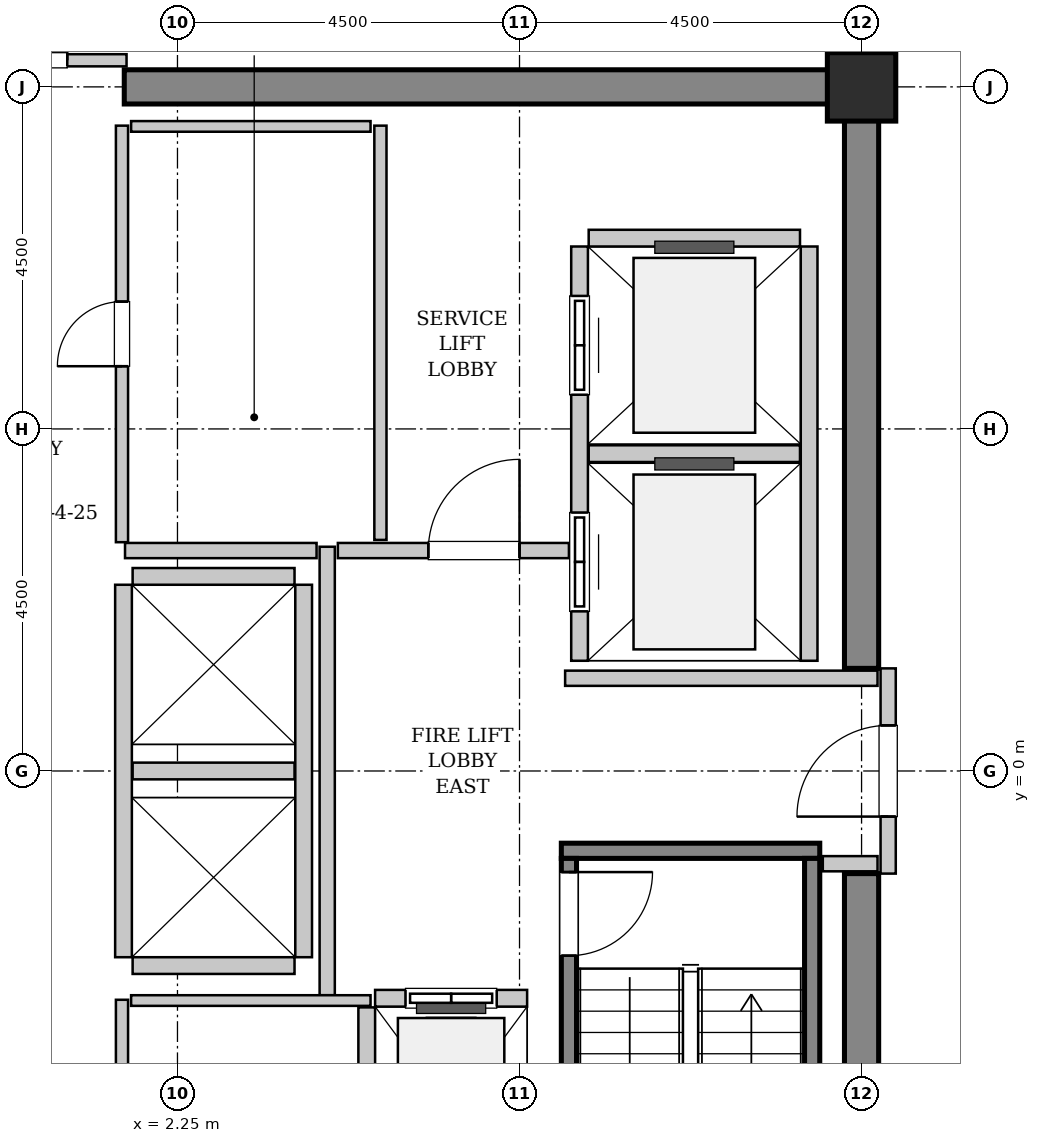
"""IFC4 building model, lengths in metres.
Left out: names, types, materials, properties, quantities, classifications, styles, units other than length and angle.
Written with IfcOpenShell. Run it as: python <this file> out.ifc"""

import sys

from ifc_helpers import new_model, si_unit, direction, frame, frame_2d, origin, origin_2d, place, context, subcontext, project, spatial, rectangle, extrude, source, transform, mapped, element, fill, save


model = new_model("IFC4")
c1 = context("Model", 3, precision=1e-05, world=origin(), true_north=direction((0.0, 1.0)))
c2 = subcontext(c1, "Body", "Model", "MODEL_VIEW")
j1 = project(units=[si_unit("LENGTHUNIT", "METRE"), si_unit("PLANEANGLEUNIT", "RADIAN")], contexts=[c1])
p1 = place(None, origin())
s1 = spatial("IfcSite", under=j1, at=p1, CompositionType="ELEMENT")
p2 = place(p1, origin())
s2 = spatial("IfcBuilding", under=s1, at=p2, CompositionType="ELEMENT")
p3 = place(p2, frame((0.0, 0.0, 302.6)))
s3 = spatial("IfcBuildingStorey", under=s2, at=p3, CompositionType="ELEMENT", Elevation=302.6)
m1 = source(origin(), c2, "Body", "SweptSolid", [
    extrude(rectangle(XDim=9.925, YDim=0.45, at=frame_2d((4.962, 0.0))), origin(), (0.0, 0.0, 1.0), 3.8),
])
p4 = place(p3, frame((1.55, 9.0, 0.0), z_axis=(0.0, 0.0, 1.0), x_axis=(1.0, 0.0, 0.0)))
e1 = element("IfcWall", 1, at=p4, inside=s3, PredefinedType="SHEAR", context=c2, shape_type="MappedRepresentation", body=[
    mapped(m1, transform((0.0, 0.0, 0.0), x_axis=(1.0, 0.0, 0.0), y_axis=(0.0, 1.0, 0.0), z_axis=(0.0, 0.0, 1.0), scale=1.0)),
])
m2 = source(origin(), c2, "Body", "SweptSolid", [
    extrude(rectangle(XDim=7.425, YDim=0.45, at=frame_2d((3.712, 0.0))), origin(), (0.0, 0.0, 1.0), 3.8),
])
for number, where, z_axis, x_axis in (
    (2, (11.25, -8.775, 0.0), (0.0, 0.0, 1.0), (0.0, 1.0, 0.0)),
    (3, (11.25, 1.35, 0.0), (0.0, 0.0, 1.0), (0.0, 1.0, 0.0)),
):
    element("IfcWall", number, at=place(p3, frame(where, z_axis=z_axis, x_axis=x_axis)), inside=s3, PredefinedType="SHEAR", context=c2, shape_type="MappedRepresentation", body=[
        mapped(m2, transform((0.0, 0.0, 0.0), x_axis=(1.0, 0.0, 0.0), y_axis=(0.0, 1.0, 0.0), z_axis=(0.0, 0.0, 1.0), scale=1.0)),
    ])
m3 = source(origin(), c2, "Body", "SweptSolid", [
    extrude(rectangle(XDim=0.9, YDim=0.9, at=origin_2d()), origin(), (0.0, 0.0, 1.0), 3.8),
])
p5 = place(p3, frame((11.25, 9.0, 0.0), z_axis=(0.0, 0.0, 1.0), x_axis=(1.0, 0.0, 0.0)))
e4 = element("IfcColumn", 4, at=p5, inside=s3, PredefinedType="COLUMN", context=c2, shape_type="MappedRepresentation", body=[
    mapped(m3, transform((0.0, 0.0, 0.0), x_axis=(1.0, 0.0, 0.0), y_axis=(0.0, 1.0, 0.0), z_axis=(0.0, 0.0, 1.0), scale=1.0)),
])
m4 = source(origin(), c2, "Body", "SweptSolid", [
    extrude(rectangle(XDim=3.4, YDim=0.2, at=frame_2d((1.7, 0.0))), origin(), (0.0, 0.0, 1.0), 3.8),
])
p6 = place(p3, frame((7.3, -1.05, 0.0), z_axis=(0.0, 0.0, 1.0), x_axis=(1.0, 0.0, 0.0)))
e5 = element("IfcWall", 5, at=p6, inside=s3, PredefinedType="SOLIDWALL", context=c2, shape_type="MappedRepresentation", body=[
    mapped(m4, transform((0.0, 0.0, 0.0), x_axis=(1.0, 0.0, 0.0), y_axis=(0.0, 1.0, 0.0), z_axis=(0.0, 0.0, 1.0), scale=1.0)),
])
m5 = source(origin(), c2, "Body", "SweptSolid", [
    extrude(rectangle(XDim=7.1, YDim=0.2, at=frame_2d((3.55, 0.0))), origin(), (0.0, 0.0, 1.0), 3.8),
])
p7 = place(p3, frame((7.4, -1.15, 0.0), z_axis=(0.0, 0.0, 1.0), x_axis=(0.0, -1.0, 0.0)))
e6 = element("IfcWall", 6, at=p7, inside=s3, PredefinedType="SOLIDWALL", context=c2, shape_type="MappedRepresentation", body=[
    mapped(m5, transform((0.0, 0.0, 0.0), x_axis=(1.0, 0.0, 0.0), y_axis=(0.0, 1.0, 0.0), z_axis=(0.0, 0.0, 1.0), scale=1.0)),
])
p8 = place(p7, frame((0.18, 0.0, 0.0)))
e7 = element("IfcOpeningElement", 7, at=p8, cuts=e6, PredefinedType="OPENING", context=c2, shape_type="SweptSolid", body=[
    extrude(rectangle(XDim=1.1, YDim=2.15, at=frame_2d((0.55, 1.075))), frame((0.0, 0.11, 0.0), z_axis=(0.0, -1.0, 0.0), x_axis=(1.0, 0.0, 0.0)), (0.0, 0.0, 1.0), 0.22),
])
p9 = place(p3, frame((10.6, -1.15, 0.0), z_axis=(0.0, 0.0, 1.0), x_axis=(0.0, -1.0, 0.0)))
e8 = element("IfcWall", 8, at=p9, inside=s3, PredefinedType="SOLIDWALL", context=c2, shape_type="MappedRepresentation", body=[
    mapped(m5, transform((0.0, 0.0, 0.0), x_axis=(1.0, 0.0, 0.0), y_axis=(0.0, 1.0, 0.0), z_axis=(0.0, 0.0, 1.0), scale=1.0)),
])
m6 = source(origin(), c2, "Body", "SweptSolid", [
    extrude(rectangle(XDim=2.0, YDim=0.22, at=frame_2d((1.0, 0.0))), origin(), (0.0, 0.0, 1.0), 3.535),
])
p10 = place(p3, frame((6.85, -2.99, 0.0), z_axis=(0.0, 0.0, 1.0), x_axis=(-1.0, 0.0, 0.0)))
e9 = element("IfcWall", 9, at=p10, inside=s3, PredefinedType="SOLIDWALL", context=c2, shape_type="MappedRepresentation", body=[
    mapped(m6, transform((0.0, 0.0, 0.0), x_axis=(1.0, 0.0, 0.0), y_axis=(0.0, 1.0, 0.0), z_axis=(0.0, 0.0, 1.0), scale=1.0)),
])
p11 = place(p10, frame((0.4, 0.0, 0.0)))
e10 = element("IfcOpeningElement", 10, at=p11, cuts=e9, PredefinedType="OPENING", context=c2, shape_type="SweptSolid", body=[
    extrude(rectangle(XDim=1.2, YDim=2.2, at=frame_2d((0.6, 1.1))), frame((0.0, 0.12, 0.0), z_axis=(0.0, -1.0, 0.0), x_axis=(1.0, 0.0, 0.0)), (0.0, 0.0, 1.0), 0.24),
])
m7 = source(origin(), c2, "Body", "SweptSolid", [
    extrude(rectangle(XDim=2.68, YDim=0.22, at=frame_2d((1.34, 0.0))), origin(), (0.0, 0.0, 1.0), 3.535),
])
p12 = place(p3, frame((4.74, -3.11, 0.0), z_axis=(0.0, 0.0, 1.0), x_axis=(0.0, -1.0, 0.0)))
e11 = element("IfcWall", 11, at=p12, inside=s3, PredefinedType="SOLIDWALL", context=c2, shape_type="MappedRepresentation", body=[
    mapped(m7, transform((0.0, 0.0, 0.0), x_axis=(1.0, 0.0, 0.0), y_axis=(0.0, 1.0, 0.0), z_axis=(0.0, 0.0, 1.0), scale=1.0)),
])
m8 = source(origin(), c2, "Body", "SweptSolid", [
    extrude(rectangle(XDim=5.45, YDim=0.22, at=frame_2d((2.725, 0.0))), origin(), (0.0, 0.0, 1.0), 3.535),
])
p13 = place(p3, frame((7.54, 6.9, 0.0), z_axis=(0.0, 0.0, 1.0), x_axis=(0.0, -1.0, 0.0)))
e12 = element("IfcWall", 12, at=p13, inside=s3, PredefinedType="SOLIDWALL", context=c2, shape_type="MappedRepresentation", body=[
    mapped(m8, transform((0.0, 0.0, 0.0), x_axis=(1.0, 0.0, 0.0), y_axis=(0.0, 1.0, 0.0), z_axis=(0.0, 0.0, 1.0), scale=1.0)),
])
p14 = place(p13, frame((3.5, 0.0, 0.0)))
e13 = element("IfcOpeningElement", 13, at=p14, cuts=e12, PredefinedType="OPENING", context=c2, shape_type="SweptSolid", body=[
    extrude(rectangle(XDim=1.3, YDim=2.3, at=frame_2d((0.65, 1.15))), frame((0.0, 0.12, 0.0), z_axis=(0.0, -1.0, 0.0), x_axis=(1.0, 0.0, 0.0)), (0.0, 0.0, 1.0), 0.24),
])
p15 = place(p13, frame((0.65, 0.0, 0.0)))
e14 = element("IfcOpeningElement", 14, at=p15, cuts=e12, PredefinedType="OPENING", context=c2, shape_type="SweptSolid", body=[
    extrude(rectangle(XDim=1.3, YDim=2.3, at=frame_2d((0.65, 1.15))), frame((0.0, 0.12, 0.0), z_axis=(0.0, -1.0, 0.0), x_axis=(1.0, 0.0, 0.0)), (0.0, 0.0, 1.0), 0.24),
])
p16 = place(p3, frame((10.56, 1.45, 0.0), z_axis=(0.0, 0.0, 1.0), x_axis=(0.0, 1.0, 0.0)))
e15 = element("IfcWall", 15, at=p16, inside=s3, PredefinedType="SOLIDWALL", context=c2, shape_type="MappedRepresentation", body=[
    mapped(m8, transform((0.0, 0.0, 0.0), x_axis=(1.0, 0.0, 0.0), y_axis=(0.0, 1.0, 0.0), z_axis=(0.0, 0.0, 1.0), scale=1.0)),
])
m9 = source(origin(), c2, "Body", "SweptSolid", [
    extrude(rectangle(XDim=2.78, YDim=0.22, at=frame_2d((1.39, 0.0))), origin(), (0.0, 0.0, 1.0), 3.535),
])
for number, where, z_axis, x_axis in (
    (16, (7.66, 4.175, 0.0), (0.0, 0.0, 1.0), (1.0, 0.0, 0.0)),
    (17, (10.44, 7.01, 0.0), (0.0, 0.0, 1.0), (-1.0, 0.0, 0.0)),
):
    element("IfcWall", number, at=place(p3, frame(where, z_axis=z_axis, x_axis=x_axis)), inside=s3, PredefinedType="SOLIDWALL", context=c2, shape_type="MappedRepresentation", body=[
        mapped(m9, transform((0.0, 0.0, 0.0), x_axis=(1.0, 0.0, 0.0), y_axis=(0.0, 1.0, 0.0), z_axis=(0.0, 0.0, 1.0), scale=1.0)),
    ])
m10 = source(origin(), c2, "Body", "SweptSolid", [
    extrude(rectangle(XDim=4.9, YDim=0.22, at=frame_2d((2.45, 0.0))), origin(), (0.0, 0.0, 1.0), 3.535),
])
for number, where, z_axis, x_axis in (
    (18, (1.54, 2.45, 0.0), (0.0, 0.0, 1.0), (0.0, -1.0, 0.0)),
    (19, (3.91, -2.45, 0.0), (0.0, 0.0, 1.0), (0.0, 1.0, 0.0)),
):
    element("IfcWall", number, at=place(p3, frame(where, z_axis=z_axis, x_axis=x_axis)), inside=s3, PredefinedType="SOLIDWALL", context=c2, shape_type="MappedRepresentation", body=[
        mapped(m10, transform((0.0, 0.0, 0.0), x_axis=(1.0, 0.0, 0.0), y_axis=(0.0, 1.0, 0.0), z_axis=(0.0, 0.0, 1.0), scale=1.0)),
    ])
m11 = source(origin(), c2, "Body", "SweptSolid", [
    extrude(rectangle(XDim=2.13, YDim=0.22, at=frame_2d((1.065, 0.0))), origin(), (0.0, 0.0, 1.0), 3.535),
])
for number, where, z_axis, x_axis in (
    (20, (1.66, -2.56, 0.0), (0.0, 0.0, 1.0), (1.0, 0.0, 0.0)),
    (21, (1.66, 0.0, 0.0), (0.0, 0.0, 1.0), (1.0, 0.0, 0.0)),
    (22, (3.79, 2.56, 0.0), (0.0, 0.0, 1.0), (-1.0, 0.0, 0.0)),
):
    element("IfcWall", number, at=place(p3, frame(where, z_axis=z_axis, x_axis=x_axis)), inside=s3, PredefinedType="SOLIDWALL", context=c2, shape_type="MappedRepresentation", body=[
        mapped(m11, transform((0.0, 0.0, 0.0), x_axis=(1.0, 0.0, 0.0), y_axis=(0.0, 1.0, 0.0), z_axis=(0.0, 0.0, 1.0), scale=1.0)),
    ])
m12 = source(origin(), c2, "Body", "SweptSolid", [
    extrude(rectangle(XDim=2.7, YDim=0.2, at=frame_2d((1.35, 0.0))), origin(), (0.0, 0.0, 1.0), 2.625),
])
p17 = place(p3, frame((11.6, -1.35, 0.0), z_axis=(0.0, 0.0, 1.0), x_axis=(0.0, 1.0, 0.0)))
e23 = element("IfcWall", 23, at=p17, inside=s3, PredefinedType="PARTITIONING", context=c2, shape_type="MappedRepresentation", body=[
    mapped(m12, transform((0.0, 0.0, 0.0), x_axis=(1.0, 0.0, 0.0), y_axis=(0.0, 1.0, 0.0), z_axis=(0.0, 0.0, 1.0), scale=1.0)),
])
p18 = place(p17, frame((0.75, 0.0, 0.0)))
e24 = element("IfcOpeningElement", 24, at=p18, cuts=e23, PredefinedType="OPENING", context=c2, shape_type="SweptSolid", body=[
    extrude(rectangle(XDim=1.2, YDim=2.15, at=frame_2d((0.6, 1.075))), frame((0.0, 0.11, 0.0), z_axis=(0.0, -1.0, 0.0), x_axis=(1.0, 0.0, 0.0)), (0.0, 0.0, 1.0), 0.22),
])
m13 = source(origin(), c2, "Body", "SweptSolid", [
    extrude(rectangle(XDim=5.9, YDim=0.2, at=frame_2d((2.95, 0.0))), origin(), (0.0, 0.0, 1.0), 3.535),
])
p19 = place(p3, frame((4.22, -2.95, 0.0), z_axis=(0.0, 0.0, 1.0), x_axis=(0.0, 1.0, 0.0)))
e25 = element("IfcWall", 25, at=p19, inside=s3, PredefinedType="PARTITIONING", context=c2, shape_type="MappedRepresentation", body=[
    mapped(m13, transform((0.0, 0.0, 0.0), x_axis=(1.0, 0.0, 0.0), y_axis=(0.0, 1.0, 0.0), z_axis=(0.0, 0.0, 1.0), scale=1.0)),
])
m14 = source(origin(), c2, "Body", "SweptSolid", [
    extrude(rectangle(XDim=2.52, YDim=0.2, at=frame_2d((1.26, 0.0))), origin(), (0.0, 0.0, 1.0), 3.535),
])
p20 = place(p3, frame((1.56, 2.9, 0.0), z_axis=(0.0, 0.0, 1.0), x_axis=(1.0, 0.0, 0.0)))
e26 = element("IfcWall", 26, at=p20, inside=s3, PredefinedType="PARTITIONING", context=c2, shape_type="MappedRepresentation", body=[
    mapped(m14, transform((0.0, 0.0, 0.0), x_axis=(1.0, 0.0, 0.0), y_axis=(0.0, 1.0, 0.0), z_axis=(0.0, 0.0, 1.0), scale=1.0)),
])
m15 = source(origin(), c2, "Body", "SweptSolid", [
    extrude(rectangle(XDim=3.04, YDim=0.2, at=frame_2d((1.52, 0.0))), origin(), (0.0, 0.0, 1.0), 3.535),
])
p21 = place(p3, frame((4.36, 2.9, 0.0), z_axis=(0.0, 0.0, 1.0), x_axis=(1.0, 0.0, 0.0)))
e27 = element("IfcWall", 27, at=p21, inside=s3, PredefinedType="PARTITIONING", context=c2, shape_type="MappedRepresentation", body=[
    mapped(m15, transform((0.0, 0.0, 0.0), x_axis=(1.0, 0.0, 0.0), y_axis=(0.0, 1.0, 0.0), z_axis=(0.0, 0.0, 1.0), scale=1.0)),
])
p22 = place(p21, frame((1.19, 0.0, 0.0)))
e28 = element("IfcOpeningElement", 28, at=p22, cuts=e27, PredefinedType="OPENING", context=c2, shape_type="SweptSolid", body=[
    extrude(rectangle(XDim=1.2, YDim=2.15, at=frame_2d((0.6, 1.075))), frame((0.0, 0.11, 0.0), z_axis=(0.0, -1.0, 0.0), x_axis=(1.0, 0.0, 0.0)), (0.0, 0.0, 1.0), 0.22),
])
m16 = source(origin(), c2, "Body", "SweptSolid", [
    extrude(rectangle(XDim=4.11, YDim=0.2, at=frame_2d((2.055, 0.0))), origin(), (0.0, 0.0, 1.0), 3.535),
])
p23 = place(p3, frame((7.35, 1.22, 0.0), z_axis=(0.0, 0.0, 1.0), x_axis=(1.0, 0.0, 0.0)))
e29 = element("IfcWall", 29, at=p23, inside=s3, PredefinedType="PARTITIONING", context=c2, shape_type="MappedRepresentation", body=[
    mapped(m16, transform((0.0, 0.0, 0.0), x_axis=(1.0, 0.0, 0.0), y_axis=(0.0, 1.0, 0.0), z_axis=(0.0, 0.0, 1.0), scale=1.0)),
])
m17 = source(origin(), c2, "Body", "SweptSolid", [
    extrude(rectangle(XDim=0.72, YDim=0.2, at=frame_2d((0.36, 0.0))), origin(), (0.0, 0.0, 1.0), 3.535),
])
p24 = place(p3, frame((10.74, -1.22, 0.0), z_axis=(0.0, 0.0, 1.0), x_axis=(1.0, 0.0, 0.0)))
e30 = element("IfcWall", 30, at=p24, inside=s3, PredefinedType="PARTITIONING", context=c2, shape_type="MappedRepresentation", body=[
    mapped(m17, transform((0.0, 0.0, 0.0), x_axis=(1.0, 0.0, 0.0), y_axis=(0.0, 1.0, 0.0), z_axis=(0.0, 0.0, 1.0), scale=1.0)),
])
m18 = source(origin(), c2, "Body", "SweptSolid", [
    extrude(rectangle(XDim=3.16, YDim=0.16, at=frame_2d((1.58, 0.0))), origin(), (0.0, 0.0, 1.0), 2.625),
])
p25 = place(p3, frame((-1.58, 9.35, 0.0), z_axis=(0.0, 0.0, 1.0), x_axis=(1.0, 0.0, 0.0)))
e31 = element("IfcWall", 31, at=p25, inside=s3, PredefinedType="PARTITIONING", context=c2, shape_type="MappedRepresentation", body=[
    mapped(m18, transform((0.0, 0.0, 0.0), x_axis=(1.0, 0.0, 0.0), y_axis=(0.0, 1.0, 0.0), z_axis=(0.0, 0.0, 1.0), scale=1.0)),
])
p26 = place(p25, frame((0.78, 0.0, 0.0)))
e32 = element("IfcOpeningElement", 32, at=p26, cuts=e31, PredefinedType="OPENING", context=c2, shape_type="SweptSolid", body=[
    extrude(rectangle(XDim=1.6, YDim=2.3, at=frame_2d((0.8, 1.15))), frame((0.0, 0.09, 0.0), z_axis=(0.0, -1.0, 0.0), x_axis=(1.0, 0.0, 0.0)), (0.0, 0.0, 1.0), 0.18),
])
m19 = source(origin(), c2, "Body", "SweptSolid", [
    extrude(rectangle(XDim=5.45, YDim=0.16, at=frame_2d((2.725, 0.0))), origin(), (0.0, 0.0, 1.0), 3.535),
])
p27 = place(p3, frame((4.92, 3.04, 0.0), z_axis=(0.0, 0.0, 1.0), x_axis=(0.0, 1.0, 0.0)))
e33 = element("IfcWall", 33, at=p27, inside=s3, PredefinedType="PARTITIONING", context=c2, shape_type="MappedRepresentation", body=[
    mapped(m19, transform((0.0, 0.0, 0.0), x_axis=(1.0, 0.0, 0.0), y_axis=(0.0, 1.0, 0.0), z_axis=(0.0, 0.0, 1.0), scale=1.0)),
])
m20 = source(origin(), c2, "Body", "SweptSolid", [
    extrude(rectangle(XDim=5.48, YDim=0.16, at=frame_2d((2.74, 0.0))), origin(), (0.0, 0.0, 1.0), 3.535),
])
p28 = place(p3, frame((1.52, 3.01, 0.0), z_axis=(0.0, 0.0, 1.0), x_axis=(0.0, 1.0, 0.0)))
e34 = element("IfcWall", 34, at=p28, inside=s3, PredefinedType="PARTITIONING", context=c2, shape_type="MappedRepresentation", body=[
    mapped(m20, transform((0.0, 0.0, 0.0), x_axis=(1.0, 0.0, 0.0), y_axis=(0.0, 1.0, 0.0), z_axis=(0.0, 0.0, 1.0), scale=1.0)),
])
p29 = place(p28, frame((2.315, 0.0, 0.0)))
e35 = element("IfcOpeningElement", 35, at=p29, cuts=e34, PredefinedType="OPENING", context=c2, shape_type="SweptSolid", body=[
    extrude(rectangle(XDim=0.85, YDim=2.1, at=frame_2d((0.425, 1.05))), frame((0.0, 0.09, 0.0), z_axis=(0.0, -1.0, 0.0), x_axis=(1.0, 0.0, 0.0)), (0.0, 0.0, 1.0), 0.18),
])
m21 = source(origin(), c2, "Body", "SweptSolid", [
    extrude(rectangle(XDim=3.15, YDim=0.14, at=frame_2d((1.575, 0.0))), origin(), (0.0, 0.0, 1.0), 3.535),
])
p30 = place(p3, frame((1.64, 8.48, 0.0), z_axis=(0.0, 0.0, 1.0), x_axis=(1.0, 0.0, 0.0)))
e36 = element("IfcWall", 36, at=p30, inside=s3, PredefinedType="PARTITIONING", context=c2, shape_type="MappedRepresentation", body=[
    mapped(m21, transform((0.0, 0.0, 0.0), x_axis=(1.0, 0.0, 0.0), y_axis=(0.0, 1.0, 0.0), z_axis=(0.0, 0.0, 1.0), scale=1.0)),
])
p31 = place(p3, frame((1.52, -8.49, 0.0), z_axis=(0.0, 0.0, 1.0), x_axis=(0.0, 1.0, 0.0)))
e37 = element("IfcWall", 37, at=p31, inside=s3, PredefinedType="PARTITIONING", context=c2, shape_type="MappedRepresentation", body=[
    mapped(m20, transform((0.0, 0.0, 0.0), x_axis=(1.0, 0.0, 0.0), y_axis=(0.0, 1.0, 0.0), z_axis=(0.0, 0.0, 1.0), scale=1.0)),
])
p32 = place(p31, frame((2.315, 0.0, 0.0)))
e38 = element("IfcOpeningElement", 38, at=p32, cuts=e37, PredefinedType="OPENING", context=c2, shape_type="SweptSolid", body=[
    extrude(rectangle(XDim=0.85, YDim=2.1, at=frame_2d((0.425, 1.05))), frame((0.0, 0.09, 0.0), z_axis=(0.0, -1.0, 0.0), x_axis=(1.0, 0.0, 0.0)), (0.0, 0.0, 1.0), 0.18),
])
p33 = place(p3, frame((1.64, -3.02, 0.0), z_axis=(0.0, 0.0, 1.0), x_axis=(1.0, 0.0, 0.0)))
e39 = element("IfcWall", 39, at=p33, inside=s3, PredefinedType="PARTITIONING", context=c2, shape_type="MappedRepresentation", body=[
    mapped(m21, transform((0.0, 0.0, 0.0), x_axis=(1.0, 0.0, 0.0), y_axis=(0.0, 1.0, 0.0), z_axis=(0.0, 0.0, 1.0), scale=1.0)),
])
m22 = source(origin(), c2, "Body", "SweptSolid", [
    extrude(rectangle(XDim=1.1, YDim=2.15, at=frame_2d((0.55, 1.075))), frame((0.0, 0.025, 0.0), z_axis=(0.0, -1.0, 0.0), x_axis=(1.0, 0.0, 0.0)), (0.0, 0.0, 1.0), 0.05),
])
p34 = place(p8, origin())
e40 = element("IfcDoor", 40, at=p34, inside=s3, OperationType="SINGLE_SWING_LEFT", PredefinedType="DOOR", context=c2, shape_type="MappedRepresentation", body=[
    mapped(m22, transform((0.0, 0.0, 0.0), x_axis=(1.0, 0.0, 0.0), y_axis=(0.0, 1.0, 0.0), z_axis=(0.0, 0.0, 1.0), scale=1.0)),
])
fill(e7, e40)
m23 = source(origin(), c2, "Body", "SweptSolid", [
    extrude(rectangle(XDim=1.2, YDim=2.2, at=frame_2d((0.6, 1.1))), frame((0.0, 0.025, 0.0), z_axis=(0.0, -1.0, 0.0), x_axis=(1.0, 0.0, 0.0)), (0.0, 0.0, 1.0), 0.05),
])
p35 = place(p11, origin())
e41 = element("IfcDoor", 41, at=p35, inside=s3, OperationType="SLIDING_TO_LEFT", PredefinedType="DOOR", context=c2, shape_type="MappedRepresentation", body=[
    mapped(m23, transform((0.0, 0.0, 0.0), x_axis=(1.0, 0.0, 0.0), y_axis=(0.0, 1.0, 0.0), z_axis=(0.0, 0.0, 1.0), scale=1.0)),
])
fill(e10, e41)
m24 = source(origin(), c2, "Body", "SweptSolid", [
    extrude(rectangle(XDim=1.3, YDim=2.3, at=frame_2d((0.65, 1.15))), frame((0.0, 0.025, 0.0), z_axis=(0.0, -1.0, 0.0), x_axis=(1.0, 0.0, 0.0)), (0.0, 0.0, 1.0), 0.05),
])
p36 = place(p14, origin())
e42 = element("IfcDoor", 42, at=p36, inside=s3, OperationType="SLIDING_TO_RIGHT", PredefinedType="DOOR", context=c2, shape_type="MappedRepresentation", body=[
    mapped(m24, transform((0.0, 0.0, 0.0), x_axis=(1.0, 0.0, 0.0), y_axis=(0.0, 1.0, 0.0), z_axis=(0.0, 0.0, 1.0), scale=1.0)),
])
fill(e13, e42)
p37 = place(p15, origin())
e43 = element("IfcDoor", 43, at=p37, inside=s3, OperationType="SLIDING_TO_RIGHT", PredefinedType="DOOR", context=c2, shape_type="MappedRepresentation", body=[
    mapped(m24, transform((0.0, 0.0, 0.0), x_axis=(1.0, 0.0, 0.0), y_axis=(0.0, 1.0, 0.0), z_axis=(0.0, 0.0, 1.0), scale=1.0)),
])
fill(e14, e43)
m25 = source(origin(), c2, "Body", "SweptSolid", [
    extrude(rectangle(XDim=1.2, YDim=2.15, at=frame_2d((0.6, 1.075))), frame((0.0, 0.025, 0.0), z_axis=(0.0, -1.0, 0.0), x_axis=(1.0, 0.0, 0.0)), (0.0, 0.0, 1.0), 0.05),
])
p38 = place(p18, origin())
e44 = element("IfcDoor", 44, at=p38, inside=s3, OperationType="SINGLE_SWING_LEFT", PredefinedType="DOOR", context=c2, shape_type="MappedRepresentation", body=[
    mapped(m25, transform((0.0, 0.0, 0.0), x_axis=(1.0, 0.0, 0.0), y_axis=(0.0, 1.0, 0.0), z_axis=(0.0, 0.0, 1.0), scale=1.0)),
])
fill(e24, e44)
p39 = place(p22, origin())
e45 = element("IfcDoor", 45, at=p39, inside=s3, OperationType="SINGLE_SWING_RIGHT", PredefinedType="DOOR", context=c2, shape_type="MappedRepresentation", body=[
    mapped(m25, transform((0.0, 0.0, 0.0), x_axis=(1.0, 0.0, 0.0), y_axis=(0.0, 1.0, 0.0), z_axis=(0.0, 0.0, 1.0), scale=1.0)),
])
fill(e28, e45)
m26 = source(origin(), c2, "Body", "SweptSolid", [
    extrude(rectangle(XDim=1.6, YDim=2.3, at=frame_2d((0.8, 1.15))), frame((0.0, 0.025, 0.0), z_axis=(0.0, -1.0, 0.0), x_axis=(1.0, 0.0, 0.0)), (0.0, 0.0, 1.0), 0.05),
])
p40 = place(p26, origin())
e46 = element("IfcDoor", 46, at=p40, inside=s3, OperationType="DOUBLE_DOOR_SINGLE_SWING", PredefinedType="DOOR", context=c2, shape_type="MappedRepresentation", body=[
    mapped(m26, transform((0.0, 0.0, 0.0), x_axis=(1.0, 0.0, 0.0), y_axis=(0.0, 1.0, 0.0), z_axis=(0.0, 0.0, 1.0), scale=1.0)),
])
fill(e32, e46)
m27 = source(origin(), c2, "Body", "SweptSolid", [
    extrude(rectangle(XDim=0.85, YDim=2.1, at=frame_2d((0.425, 1.05))), frame((0.0, 0.025, 0.0), z_axis=(0.0, -1.0, 0.0), x_axis=(1.0, 0.0, 0.0)), (0.0, 0.0, 1.0), 0.05),
])
p41 = place(p29, origin())
e47 = element("IfcDoor", 47, at=p41, inside=s3, OperationType="SINGLE_SWING_LEFT", PredefinedType="DOOR", context=c2, shape_type="MappedRepresentation", body=[
    mapped(m27, transform((0.0, 0.0, 0.0), x_axis=(1.0, 0.0, 0.0), y_axis=(0.0, 1.0, 0.0), z_axis=(0.0, 0.0, 1.0), scale=1.0)),
])
fill(e35, e47)
save(model, sys.argv[1])
